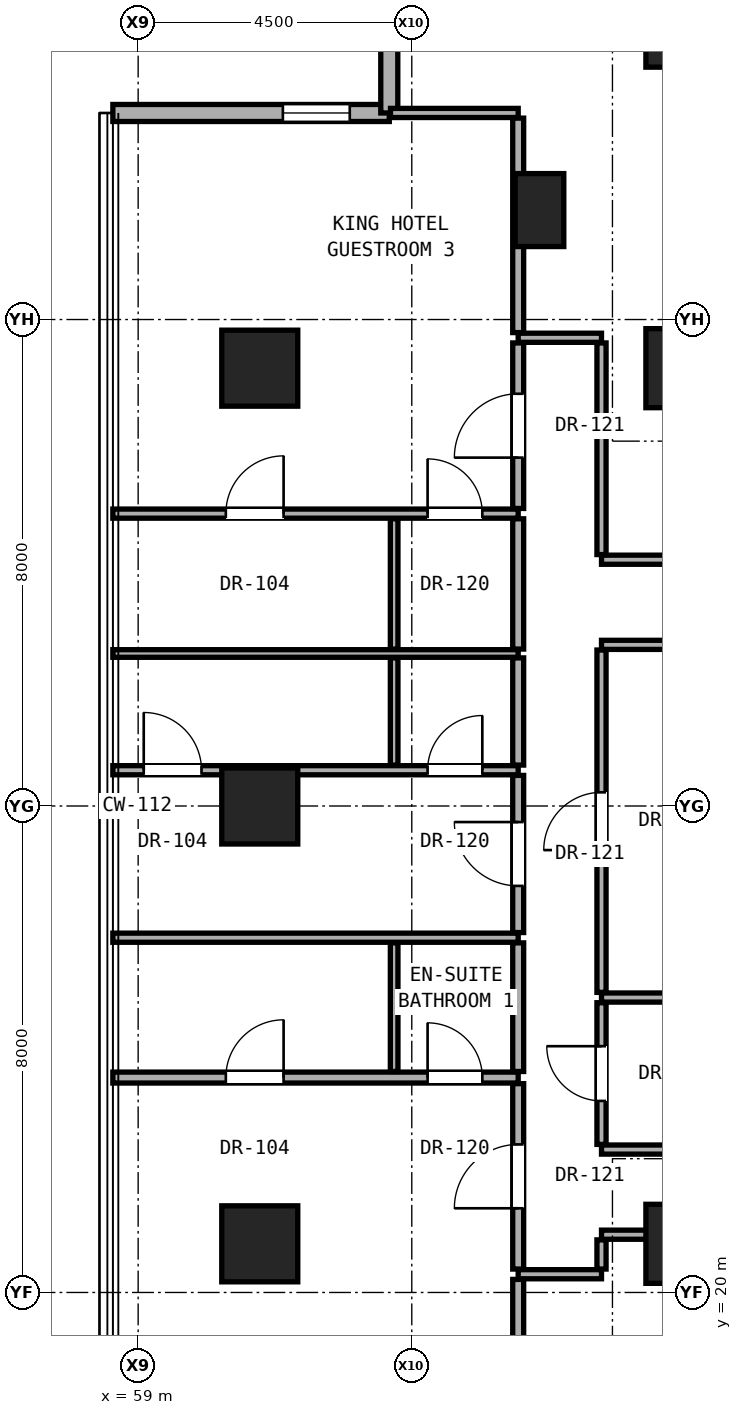
"""IFC4 building model, lengths in metres.
Left out: names, types, materials, properties, quantities, classifications, styles, units other than length and angle.
Written with IfcOpenShell. Run it as: python <this file> out.ifc"""

import sys

from ifc_helpers import new_model, si_unit, direction, frame, frame_2d, origin, origin_2d, place, context, subcontext, project, spatial, rectangle, hollow_rectangle, extrude, element, fill, save


model = new_model("IFC4")
c1 = context("Model", 3, precision=1e-05, world=origin(), true_north=direction((0.0, 1.0)))
c2 = subcontext(c1, "Body", "Model", "MODEL_VIEW")
j1 = project(units=[si_unit("LENGTHUNIT", "METRE"), si_unit("PLANEANGLEUNIT", "RADIAN")], contexts=[c1])
p1 = place(None, origin())
s1 = spatial("IfcSite", under=j1, at=p1, CompositionType="ELEMENT")
p2 = place(p1, origin())
s2 = spatial("IfcBuilding", under=s1, at=p2, CompositionType="ELEMENT")
p3 = place(p2, frame((0.0, 0.0, 58.7)))
s3 = spatial("IfcBuildingStorey", under=s2, at=p3, CompositionType="ELEMENT", Elevation=58.7)
for number, where, z_axis, x_axis in (
    (1, (68.0, 20.8, 0.0), (0.0, 0.0, 1.0), (1.0, 0.0, 0.0)),
    (2, (68.0, 35.2, 0.0), (0.0, 0.0, 1.0), (1.0, 0.0, 0.0)),
    (3, (68.0, 40.8, 0.0), (0.0, 0.0, 1.0), (1.0, 0.0, 0.0)),
):
    element("IfcColumn", number, at=place(p3, frame(where, z_axis=z_axis, x_axis=x_axis)), inside=s3, PredefinedType="COLUMN", context=c2, shape_type="SweptSolid", body=[
        extrude(rectangle(XDim=1.3, YDim=1.3, at=origin_2d()), origin(), (0.0, 0.0, 1.0), 3.3),
    ])
for number, where, z_axis, x_axis in (
    (4, (61.0, 20.8, 0.0), (0.0, 0.0, 1.0), (1.0, 0.0, 0.0)),
    (5, (61.0, 28.0, 0.0), (0.0, 0.0, 1.0), (1.0, 0.0, 0.0)),
    (6, (61.0, 35.2, 0.0), (0.0, 0.0, 1.0), (1.0, 0.0, 0.0)),
):
    element("IfcColumn", number, at=place(p3, frame(where, z_axis=z_axis, x_axis=x_axis)), inside=s3, PredefinedType="COLUMN", context=c2, shape_type="SweptSolid", body=[
        extrude(hollow_rectangle(XDim=1.25, YDim=1.25, WallThickness=0.07, at=origin_2d()), origin(), (0.0, 0.0, 1.0), 3.3),
    ])
p4 = place(p3, frame((65.6, 37.8, 0.0), z_axis=(0.0, 0.0, 1.0), x_axis=(1.0, 0.0, 0.0)))
e7 = element("IfcColumn", 7, at=p4, inside=s3, PredefinedType="PILASTER", context=c2, shape_type="SweptSolid", body=[
    extrude(rectangle(XDim=0.8, YDim=1.2, at=origin_2d()), origin(), (0.0, 0.0, 1.0), 3.3),
])
p5 = place(p3, frame((63.13, 39.396, 0.0), z_axis=(0.0, 0.0, 1.0), x_axis=(-1.0, 0.0, 0.0)))
e8 = element("IfcWall", 8, at=p5, inside=s3, PredefinedType="SOLIDWALL", context=c2, shape_type="SweptSolid", body=[
    extrude(rectangle(XDim=4.546, YDim=0.28, at=frame_2d((2.273, 0.0))), origin(), (0.0, 0.0, 1.0), 3.04),
])
p6 = place(p5, frame((0.65, 0.0, 0.85)))
e9 = element("IfcOpeningElement", 9, at=p6, cuts=e8, PredefinedType="OPENING", context=c2, shape_type="SweptSolid", body=[
    extrude(rectangle(XDim=1.1, YDim=2.0, at=frame_2d((0.55, 1.0))), frame((0.0, 0.15, 0.0), z_axis=(0.0, -1.0, 0.0), x_axis=(1.0, 0.0, 0.0)), (0.0, 0.0, 1.0), 0.3),
])
p7 = place(p3, frame((63.13, 43.943, 0.0), z_axis=(0.0, 0.0, 1.0), x_axis=(0.0, -1.0, 0.0)))
e10 = element("IfcWall", 10, at=p7, inside=s3, PredefinedType="SOLIDWALL", context=c2, shape_type="SweptSolid", body=[
    extrude(rectangle(XDim=4.546, YDim=0.28, at=frame_2d((2.273, 0.0))), origin(), (0.0, 0.0, 1.0), 3.04),
])
p8 = place(p3, frame((65.25, 20.3, 0.0), z_axis=(0.0, 0.0, 1.0), x_axis=(1.0, 0.0, 0.0)))
e11 = element("IfcWall", 11, at=p8, inside=s3, PredefinedType="PARTITIONING", context=c2, shape_type="SweptSolid", body=[
    extrude(rectangle(XDim=1.37, YDim=0.15, at=frame_2d((0.685, 0.0))), origin(), (0.0, 0.0, 1.0), 3.06),
])
p9 = place(p3, frame((66.62, 20.95, 0.0), z_axis=(0.0, 0.0, 1.0), x_axis=(1.0, 0.0, 0.0)))
e12 = element("IfcWall", 12, at=p9, inside=s3, PredefinedType="PARTITIONING", context=c2, shape_type="SweptSolid", body=[
    extrude(rectangle(XDim=1.06, YDim=0.15, at=frame_2d((0.53, 0.0))), origin(), (0.0, 0.0, 1.0), 2.452),
])
p10 = place(p3, frame((66.62, 22.35, 0.0), z_axis=(0.0, 0.0, 1.0), x_axis=(1.0, 0.0, 0.0)))
e13 = element("IfcWall", 13, at=p10, inside=s3, PredefinedType="PARTITIONING", context=c2, shape_type="SweptSolid", body=[
    extrude(rectangle(XDim=19.63, YDim=0.15, at=frame_2d((9.815, 0.0))), origin(), (0.0, 0.0, 1.0), 2.125),
])
p11 = place(p10, frame((12.085, 0.0, 0.0)))
e14 = element("IfcOpeningElement", 14, at=p11, cuts=e13, PredefinedType="OPENING", context=c2, shape_type="SweptSolid", body=[
    extrude(rectangle(XDim=0.85, YDim=2.01, at=frame_2d((0.425, 1.005))), frame((0.0, 0.085, 0.0), z_axis=(0.0, -1.0, 0.0), x_axis=(1.0, 0.0, 0.0)), (0.0, 0.0, 1.0), 0.17),
])
p12 = place(p3, frame((58.584, 23.534, 0.0), z_axis=(0.0, 0.0, 1.0), x_axis=(1.0, 0.0, 0.0)))
e15 = element("IfcWall", 15, at=p12, inside=s3, PredefinedType="PARTITIONING", context=c2, shape_type="SweptSolid", body=[
    extrude(rectangle(XDim=6.666, YDim=0.18, at=frame_2d((3.333, 0.0))), origin(), (0.0, 0.0, 1.0), 2.196),
])
p13 = place(p12, frame((1.858, 0.0, 0.0)))
e16 = element("IfcOpeningElement", 16, at=p13, cuts=e15, PredefinedType="OPENING", context=c2, shape_type="SweptSolid", body=[
    extrude(rectangle(XDim=0.95, YDim=2.15, at=frame_2d((0.475, 1.075))), frame((0.0, 0.1, 0.0), z_axis=(0.0, -1.0, 0.0), x_axis=(1.0, 0.0, 0.0)), (0.0, 0.0, 1.0), 0.2),
])
p14 = place(p12, frame((5.176, 0.0, 0.0)))
e17 = element("IfcOpeningElement", 17, at=p14, cuts=e15, PredefinedType="OPENING", context=c2, shape_type="SweptSolid", body=[
    extrude(rectangle(XDim=0.9, YDim=2.1, at=frame_2d((0.45, 1.05))), frame((0.0, 0.1, 0.0), z_axis=(0.0, -1.0, 0.0), x_axis=(1.0, 0.0, 0.0)), (0.0, 0.0, 1.0), 0.2),
])
p15 = place(p3, frame((66.62, 24.85, 0.0), z_axis=(0.0, 0.0, 1.0), x_axis=(1.0, 0.0, 0.0)))
e18 = element("IfcWall", 18, at=p15, inside=s3, PredefinedType="PARTITIONING", context=c2, shape_type="SweptSolid", body=[
    extrude(rectangle(XDim=3.13, YDim=0.15, at=frame_2d((1.565, 0.0))), origin(), (0.0, 0.0, 1.0), 2.125),
])
p16 = place(p3, frame((58.584, 25.834, 0.0), z_axis=(0.0, 0.0, 1.0), x_axis=(1.0, 0.0, 0.0)))
e19 = element("IfcWall", 19, at=p16, inside=s3, PredefinedType="PARTITIONING", context=c2, shape_type="SweptSolid", body=[
    extrude(rectangle(XDim=6.666, YDim=0.15, at=frame_2d((3.333, 0.0))), origin(), (0.0, 0.0, 1.0), 2.196),
])
p17 = place(p3, frame((58.584, 28.588, 0.0), z_axis=(0.0, 0.0, 1.0), x_axis=(1.0, 0.0, 0.0)))
e20 = element("IfcWall", 20, at=p17, inside=s3, PredefinedType="PARTITIONING", context=c2, shape_type="SweptSolid", body=[
    extrude(rectangle(XDim=6.666, YDim=0.15, at=frame_2d((3.333, 0.0))), origin(), (0.0, 0.0, 1.0), 2.196),
])
p18 = place(p17, frame((0.508, 0.0, 0.0)))
e21 = element("IfcOpeningElement", 21, at=p18, cuts=e20, PredefinedType="OPENING", context=c2, shape_type="SweptSolid", body=[
    extrude(rectangle(XDim=0.95, YDim=2.15, at=frame_2d((0.475, 1.075))), frame((0.0, 0.085, 0.0), z_axis=(0.0, -1.0, 0.0), x_axis=(1.0, 0.0, 0.0)), (0.0, 0.0, 1.0), 0.17),
])
p19 = place(p17, frame((5.176, 0.0, 0.0)))
e22 = element("IfcOpeningElement", 22, at=p19, cuts=e20, PredefinedType="OPENING", context=c2, shape_type="SweptSolid", body=[
    extrude(rectangle(XDim=0.9, YDim=2.1, at=frame_2d((0.45, 1.05))), frame((0.0, 0.085, 0.0), z_axis=(0.0, -1.0, 0.0), x_axis=(1.0, 0.0, 0.0)), (0.0, 0.0, 1.0), 0.17),
])
p20 = place(p3, frame((58.584, 30.508, 0.0), z_axis=(0.0, 0.0, 1.0), x_axis=(1.0, 0.0, 0.0)))
e23 = element("IfcWall", 23, at=p20, inside=s3, PredefinedType="PARTITIONING", context=c2, shape_type="SweptSolid", body=[
    extrude(rectangle(XDim=6.666, YDim=0.125, at=frame_2d((3.333, 0.0))), origin(), (0.0, 0.0, 1.0), 2.196),
])
p21 = place(p3, frame((66.62, 30.65, 0.0), z_axis=(0.0, 0.0, 1.0), x_axis=(1.0, 0.0, 0.0)))
e24 = element("IfcWall", 24, at=p21, inside=s3, PredefinedType="PARTITIONING", context=c2, shape_type="SweptSolid", body=[
    extrude(rectangle(XDim=19.63, YDim=0.15, at=frame_2d((9.815, 0.0))), origin(), (0.0, 0.0, 1.0), 2.125),
])
p22 = place(p21, frame((3.855, 0.0, 0.0)))
e25 = element("IfcOpeningElement", 25, at=p22, cuts=e24, PredefinedType="OPENING", context=c2, shape_type="SweptSolid", body=[
    extrude(rectangle(XDim=0.85, YDim=2.01, at=frame_2d((0.425, 1.005))), frame((0.0, 0.085, 0.0), z_axis=(0.0, -1.0, 0.0), x_axis=(1.0, 0.0, 0.0)), (0.0, 0.0, 1.0), 0.17),
])
p23 = place(p21, frame((12.085, 0.0, 0.0)))
e26 = element("IfcOpeningElement", 26, at=p23, cuts=e24, PredefinedType="OPENING", context=c2, shape_type="SweptSolid", body=[
    extrude(rectangle(XDim=0.85, YDim=2.01, at=frame_2d((0.425, 1.005))), frame((0.0, 0.085, 0.0), z_axis=(0.0, -1.0, 0.0), x_axis=(1.0, 0.0, 0.0)), (0.0, 0.0, 1.0), 0.17),
])
p24 = place(p3, frame((66.62, 32.05, 0.0), z_axis=(0.0, 0.0, 1.0), x_axis=(1.0, 0.0, 0.0)))
e27 = element("IfcWall", 27, at=p24, inside=s3, PredefinedType="PARTITIONING", context=c2, shape_type="SweptSolid", body=[
    extrude(rectangle(XDim=2.18, YDim=0.15, at=frame_2d((1.09, 0.0))), origin(), (0.0, 0.0, 1.0), 2.125),
])
p25 = place(p3, frame((58.584, 32.808, 0.0), z_axis=(0.0, 0.0, 1.0), x_axis=(1.0, 0.0, 0.0)))
e28 = element("IfcWall", 28, at=p25, inside=s3, PredefinedType="PARTITIONING", context=c2, shape_type="SweptSolid", body=[
    extrude(rectangle(XDim=6.666, YDim=0.15, at=frame_2d((3.333, 0.0))), origin(), (0.0, 0.0, 1.0), 2.196),
])
p26 = place(p25, frame((1.858, 0.0, 0.0)))
e29 = element("IfcOpeningElement", 29, at=p26, cuts=e28, PredefinedType="OPENING", context=c2, shape_type="SweptSolid", body=[
    extrude(rectangle(XDim=0.95, YDim=2.15, at=frame_2d((0.475, 1.075))), frame((0.0, 0.085, 0.0), z_axis=(0.0, -1.0, 0.0), x_axis=(1.0, 0.0, 0.0)), (0.0, 0.0, 1.0), 0.17),
])
p27 = place(p25, frame((5.176, 0.0, 0.0)))
e30 = element("IfcOpeningElement", 30, at=p27, cuts=e28, PredefinedType="OPENING", context=c2, shape_type="SweptSolid", body=[
    extrude(rectangle(XDim=0.9, YDim=2.1, at=frame_2d((0.45, 1.05))), frame((0.0, 0.085, 0.0), z_axis=(0.0, -1.0, 0.0), x_axis=(1.0, 0.0, 0.0)), (0.0, 0.0, 1.0), 0.17),
])
p28 = place(p3, frame((65.25, 35.7, 0.0), z_axis=(0.0, 0.0, 1.0), x_axis=(1.0, 0.0, 0.0)))
e31 = element("IfcWall", 31, at=p28, inside=s3, PredefinedType="PARTITIONING", context=c2, shape_type="SweptSolid", body=[
    extrude(rectangle(XDim=1.37, YDim=0.15, at=frame_2d((0.685, 0.0))), origin(), (0.0, 0.0, 1.0), 3.06),
])
p29 = place(p3, frame((63.15, 39.397, 0.0), z_axis=(0.0, 0.0, 1.0), x_axis=(1.0, 0.0, 0.0)))
e32 = element("IfcWall", 32, at=p29, inside=s3, PredefinedType="PARTITIONING", context=c2, shape_type="SweptSolid", body=[
    extrude(rectangle(XDim=2.1, YDim=0.15, at=frame_2d((1.05, 0.0))), origin(), (0.0, 0.0, 1.0), 3.06),
])
p30 = place(p3, frame((63.21, 23.634, 0.0), z_axis=(0.0, 0.0, 1.0), x_axis=(0.0, 1.0, 0.0)))
e33 = element("IfcWall", 33, at=p30, inside=s3, PredefinedType="PARTITIONING", context=c2, shape_type="SweptSolid", body=[
    extrude(rectangle(XDim=2.115, YDim=0.125, at=frame_2d((1.058, 0.0))), origin(), (0.0, 0.0, 1.0), 3.06),
])
p31 = place(p3, frame((63.21, 28.673, 0.0), z_axis=(0.0, 0.0, 1.0), x_axis=(0.0, 1.0, 0.0)))
e34 = element("IfcWall", 34, at=p31, inside=s3, PredefinedType="PARTITIONING", context=c2, shape_type="SweptSolid", body=[
    extrude(rectangle(XDim=1.762, YDim=0.125, at=frame_2d((0.881, 0.0))), origin(), (0.0, 0.0, 1.0), 3.06),
])
p32 = place(p3, frame((63.21, 30.581, 0.0), z_axis=(0.0, 0.0, 1.0), x_axis=(0.0, 1.0, 0.0)))
e35 = element("IfcWall", 35, at=p32, inside=s3, PredefinedType="PARTITIONING", context=c2, shape_type="SweptSolid", body=[
    extrude(rectangle(XDim=2.142, YDim=0.125, at=frame_2d((1.071, 0.0))), origin(), (0.0, 0.0, 1.0), 3.06),
])
p33 = place(p3, frame((65.25, 16.703, 0.0), z_axis=(0.0, 0.0, 1.0), x_axis=(0.0, 1.0, 0.0)))
e36 = element("IfcWall", 36, at=p33, inside=s3, PredefinedType="PARTITIONING", context=c2, shape_type="SweptSolid", body=[
    extrude(rectangle(XDim=3.512, YDim=0.18, at=frame_2d((1.756, 0.0))), origin(), (0.0, 0.0, 1.0), 2.436),
])
p34 = place(p3, frame((65.25, 20.385, 0.0), z_axis=(0.0, 0.0, 1.0), x_axis=(0.0, 1.0, 0.0)))
e37 = element("IfcWall", 37, at=p34, inside=s3, PredefinedType="PARTITIONING", context=c2, shape_type="SweptSolid", body=[
    extrude(rectangle(XDim=3.049, YDim=0.18, at=frame_2d((1.524, 0.0))), origin(), (0.0, 0.0, 1.0), 2.452),
])
p35 = place(p34, frame((1.0, 0.0, 0.0)))
e38 = element("IfcOpeningElement", 38, at=p35, cuts=e37, PredefinedType="OPENING", context=c2, shape_type="SweptSolid", body=[
    extrude(rectangle(XDim=1.05, YDim=2.2, at=frame_2d((0.525, 1.1))), frame((0.0, 0.1, 0.0), z_axis=(0.0, -1.0, 0.0), x_axis=(1.0, 0.0, 0.0)), (0.0, 0.0, 1.0), 0.2),
])
p36 = place(p3, frame((65.25, 23.634, 0.0), z_axis=(0.0, 0.0, 1.0), x_axis=(0.0, 1.0, 0.0)))
e39 = element("IfcWall", 39, at=p36, inside=s3, PredefinedType="PARTITIONING", context=c2, shape_type="SweptSolid", body=[
    extrude(rectangle(XDim=2.115, YDim=0.18, at=frame_2d((1.058, 0.0))), origin(), (0.0, 0.0, 1.0), 3.06),
])
p37 = place(p3, frame((65.25, 25.919, 0.0), z_axis=(0.0, 0.0, 1.0), x_axis=(0.0, 1.0, 0.0)))
e40 = element("IfcWall", 40, at=p37, inside=s3, PredefinedType="PARTITIONING", context=c2, shape_type="SweptSolid", body=[
    extrude(rectangle(XDim=2.584, YDim=0.18, at=frame_2d((1.292, 0.0))), origin(), (0.0, 0.0, 1.0), 2.279),
])
p38 = place(p37, frame((0.767, 0.0, 0.0)))
e41 = element("IfcOpeningElement", 41, at=p38, cuts=e40, PredefinedType="OPENING", context=c2, shape_type="SweptSolid", body=[
    extrude(rectangle(XDim=1.05, YDim=2.2, at=frame_2d((0.525, 1.1))), frame((0.0, 0.1, 0.0), z_axis=(0.0, -1.0, 0.0), x_axis=(1.0, 0.0, 0.0)), (0.0, 0.0, 1.0), 0.2),
])
p39 = place(p3, frame((65.25, 28.673, 0.0), z_axis=(0.0, 0.0, 1.0), x_axis=(0.0, 1.0, 0.0)))
e42 = element("IfcWall", 42, at=p39, inside=s3, PredefinedType="PARTITIONING", context=c2, shape_type="SweptSolid", body=[
    extrude(rectangle(XDim=1.762, YDim=0.18, at=frame_2d((0.881, 0.0))), origin(), (0.0, 0.0, 1.0), 3.06),
])
p40 = place(p3, frame((65.25, 30.581, 0.0), z_axis=(0.0, 0.0, 1.0), x_axis=(0.0, 1.0, 0.0)))
e43 = element("IfcWall", 43, at=p40, inside=s3, PredefinedType="PARTITIONING", context=c2, shape_type="SweptSolid", body=[
    extrude(rectangle(XDim=2.142, YDim=0.18, at=frame_2d((1.071, 0.0))), origin(), (0.0, 0.0, 1.0), 3.06),
])
p41 = place(p3, frame((65.25, 32.893, 0.0), z_axis=(0.0, 0.0, 1.0), x_axis=(0.0, 1.0, 0.0)))
e44 = element("IfcWall", 44, at=p41, inside=s3, PredefinedType="PARTITIONING", context=c2, shape_type="SweptSolid", body=[
    extrude(rectangle(XDim=2.722, YDim=0.18, at=frame_2d((1.361, 0.0))), origin(), (0.0, 0.0, 1.0), 2.452),
])
p42 = place(p41, frame((0.836, 0.0, 0.0)))
e45 = element("IfcOpeningElement", 45, at=p42, cuts=e44, PredefinedType="OPENING", context=c2, shape_type="SweptSolid", body=[
    extrude(rectangle(XDim=1.05, YDim=2.2, at=frame_2d((0.525, 1.1))), frame((0.0, 0.1, 0.0), z_axis=(0.0, -1.0, 0.0), x_axis=(1.0, 0.0, 0.0)), (0.0, 0.0, 1.0), 0.2),
])
p43 = place(p3, frame((65.25, 35.785, 0.0), z_axis=(0.0, 0.0, 1.0), x_axis=(0.0, 1.0, 0.0)))
e46 = element("IfcWall", 46, at=p43, inside=s3, PredefinedType="PARTITIONING", context=c2, shape_type="SweptSolid", body=[
    extrude(rectangle(XDim=3.527, YDim=0.18, at=frame_2d((1.764, 0.0))), origin(), (0.0, 0.0, 1.0), 2.436),
])
p44 = place(p3, frame((66.62, 20.385, 0.0), z_axis=(0.0, 0.0, 1.0), x_axis=(0.0, 1.0, 0.0)))
e47 = element("IfcWall", 47, at=p44, inside=s3, PredefinedType="PARTITIONING", context=c2, shape_type="SweptSolid", body=[
    extrude(rectangle(XDim=0.48, YDim=0.15, at=frame_2d((0.24, 0.0))), origin(), (0.0, 0.0, 1.0), 2.452),
])
p45 = place(p3, frame((66.62, 22.435, 0.0), z_axis=(0.0, 0.0, 1.0), x_axis=(0.0, 1.0, 0.0)))
e48 = element("IfcWall", 48, at=p45, inside=s3, PredefinedType="PARTITIONING", context=c2, shape_type="SweptSolid", body=[
    extrude(rectangle(XDim=2.33, YDim=0.15, at=frame_2d((1.165, 0.0))), origin(), (0.0, 0.0, 1.0), 3.06),
])
p46 = place(p45, frame((0.715, 0.0, 0.0)))
e49 = element("IfcOpeningElement", 49, at=p46, cuts=e48, PredefinedType="OPENING", context=c2, shape_type="SweptSolid", body=[
    extrude(rectangle(XDim=0.9, YDim=2.1, at=frame_2d((0.45, 1.05))), frame((0.0, 0.085, 0.0), z_axis=(0.0, -1.0, 0.0), x_axis=(1.0, 0.0, 0.0)), (0.0, 0.0, 1.0), 0.17),
])
p47 = place(p3, frame((66.62, 24.935, 0.0), z_axis=(0.0, 0.0, 1.0), x_axis=(0.0, 1.0, 0.0)))
e50 = element("IfcWall", 50, at=p47, inside=s3, PredefinedType="PARTITIONING", context=c2, shape_type="SweptSolid", body=[
    extrude(rectangle(XDim=5.63, YDim=0.15, at=frame_2d((2.815, 0.0))), origin(), (0.0, 0.0, 1.0), 2.279),
])
p48 = place(p47, frame((2.34, 0.0, 0.0)))
e51 = element("IfcOpeningElement", 51, at=p48, cuts=e50, PredefinedType="OPENING", context=c2, shape_type="SweptSolid", body=[
    extrude(rectangle(XDim=0.95, YDim=2.15, at=frame_2d((0.475, 1.075))), frame((0.0, 0.085, 0.0), z_axis=(0.0, -1.0, 0.0), x_axis=(1.0, 0.0, 0.0)), (0.0, 0.0, 1.0), 0.17),
])
p49 = place(p3, frame((66.62, 32.135, 0.0), z_axis=(0.0, 0.0, 1.0), x_axis=(0.0, 1.0, 0.0)))
e52 = element("IfcWall", 52, at=p49, inside=s3, PredefinedType="PARTITIONING", context=c2, shape_type="SweptSolid", body=[
    extrude(rectangle(XDim=3.48, YDim=0.15, at=frame_2d((1.74, 0.0))), origin(), (0.0, 0.0, 1.0), 2.452),
])
p50 = place(p6, origin())
e53 = element("IfcWindow", 53, at=p50, inside=s3, PartitioningType="SINGLE_PANEL", PredefinedType="WINDOW", context=c2, shape_type="SweptSolid", body=[
    extrude(rectangle(XDim=1.1, YDim=2.0, at=frame_2d((0.55, 1.0))), frame((0.0, 0.03, 0.0), z_axis=(0.0, -1.0, 0.0), x_axis=(1.0, 0.0, 0.0)), (0.0, 0.0, 1.0), 0.06),
])
fill(e9, e53)
p51 = place(p46, origin())
e54 = element("IfcDoor", 54, at=p51, inside=s3, OperationType="SINGLE_SWING_RIGHT", PredefinedType="DOOR", context=c2, shape_type="SweptSolid", body=[
    extrude(rectangle(XDim=0.9, YDim=2.1, at=frame_2d((0.45, 1.05))), frame((0.0, 0.025, 0.0), z_axis=(0.0, -1.0, 0.0), x_axis=(1.0, 0.0, 0.0)), (0.0, 0.0, 1.0), 0.05),
])
fill(e49, e54)
p52 = place(p35, origin())
e55 = element("IfcDoor", 55, at=p52, inside=s3, OperationType="SINGLE_SWING_LEFT", PredefinedType="DOOR", context=c2, shape_type="SweptSolid", body=[
    extrude(rectangle(XDim=1.05, YDim=2.2, at=frame_2d((0.525, 1.1))), frame((0.0, 0.025, 0.0), z_axis=(0.0, -1.0, 0.0), x_axis=(1.0, 0.0, 0.0)), (0.0, 0.0, 1.0), 0.05),
])
fill(e38, e55)
p53 = place(p13, origin())
e56 = element("IfcDoor", 56, at=p53, inside=s3, OperationType="SINGLE_SWING_RIGHT", PredefinedType="DOOR", context=c2, shape_type="SweptSolid", body=[
    extrude(rectangle(XDim=0.95, YDim=2.15, at=frame_2d((0.475, 1.075))), frame((0.0, 0.025, 0.0), z_axis=(0.0, -1.0, 0.0), x_axis=(1.0, 0.0, 0.0)), (0.0, 0.0, 1.0), 0.05),
])
fill(e16, e56)
p54 = place(p14, origin())
e57 = element("IfcDoor", 57, at=p54, inside=s3, OperationType="SINGLE_SWING_LEFT", PredefinedType="DOOR", context=c2, shape_type="SweptSolid", body=[
    extrude(rectangle(XDim=0.9, YDim=2.1, at=frame_2d((0.45, 1.05))), frame((0.0, 0.025, 0.0), z_axis=(0.0, -1.0, 0.0), x_axis=(1.0, 0.0, 0.0)), (0.0, 0.0, 1.0), 0.05),
])
fill(e17, e57)
p55 = place(p38, origin())
e58 = element("IfcDoor", 58, at=p55, inside=s3, OperationType="SINGLE_SWING_RIGHT", PredefinedType="DOOR", context=c2, shape_type="SweptSolid", body=[
    extrude(rectangle(XDim=1.05, YDim=2.2, at=frame_2d((0.525, 1.1))), frame((0.0, 0.025, 0.0), z_axis=(0.0, -1.0, 0.0), x_axis=(1.0, 0.0, 0.0)), (0.0, 0.0, 1.0), 0.05),
])
fill(e41, e58)
p56 = place(p18, origin())
e59 = element("IfcDoor", 59, at=p56, inside=s3, OperationType="SINGLE_SWING_LEFT", PredefinedType="DOOR", context=c2, shape_type="SweptSolid", body=[
    extrude(rectangle(XDim=0.95, YDim=2.15, at=frame_2d((0.475, 1.075))), frame((0.0, 0.025, 0.0), z_axis=(0.0, -1.0, 0.0), x_axis=(1.0, 0.0, 0.0)), (0.0, 0.0, 1.0), 0.05),
])
fill(e21, e59)
p57 = place(p19, origin())
e60 = element("IfcDoor", 60, at=p57, inside=s3, OperationType="SINGLE_SWING_RIGHT", PredefinedType="DOOR", context=c2, shape_type="SweptSolid", body=[
    extrude(rectangle(XDim=0.9, YDim=2.1, at=frame_2d((0.45, 1.05))), frame((0.0, 0.025, 0.0), z_axis=(0.0, -1.0, 0.0), x_axis=(1.0, 0.0, 0.0)), (0.0, 0.0, 1.0), 0.05),
])
fill(e22, e60)
p58 = place(p42, origin())
e61 = element("IfcDoor", 61, at=p58, inside=s3, OperationType="SINGLE_SWING_LEFT", PredefinedType="DOOR", context=c2, shape_type="SweptSolid", body=[
    extrude(rectangle(XDim=1.05, YDim=2.2, at=frame_2d((0.525, 1.1))), frame((0.0, 0.025, 0.0), z_axis=(0.0, -1.0, 0.0), x_axis=(1.0, 0.0, 0.0)), (0.0, 0.0, 1.0), 0.05),
])
fill(e45, e61)
p59 = place(p26, origin())
e62 = element("IfcDoor", 62, at=p59, inside=s3, OperationType="SINGLE_SWING_RIGHT", PredefinedType="DOOR", context=c2, shape_type="SweptSolid", body=[
    extrude(rectangle(XDim=0.95, YDim=2.15, at=frame_2d((0.475, 1.075))), frame((0.0, 0.025, 0.0), z_axis=(0.0, -1.0, 0.0), x_axis=(1.0, 0.0, 0.0)), (0.0, 0.0, 1.0), 0.05),
])
fill(e29, e62)
p60 = place(p27, origin())
e63 = element("IfcDoor", 63, at=p60, inside=s3, OperationType="SINGLE_SWING_LEFT", PredefinedType="DOOR", context=c2, shape_type="SweptSolid", body=[
    extrude(rectangle(XDim=0.9, YDim=2.1, at=frame_2d((0.45, 1.05))), frame((0.0, 0.025, 0.0), z_axis=(0.0, -1.0, 0.0), x_axis=(1.0, 0.0, 0.0)), (0.0, 0.0, 1.0), 0.05),
])
fill(e30, e63)
p61 = place(p48, origin())
e64 = element("IfcDoor", 64, at=p61, inside=s3, OperationType="SINGLE_SWING_LEFT", PredefinedType="DOOR", context=c2, shape_type="SweptSolid", body=[
    extrude(rectangle(XDim=0.95, YDim=2.15, at=frame_2d((0.475, 1.075))), frame((0.0, 0.025, 0.0), z_axis=(0.0, -1.0, 0.0), x_axis=(1.0, 0.0, 0.0)), (0.0, 0.0, 1.0), 0.05),
])
fill(e51, e64)
save(model, sys.argv[1])
